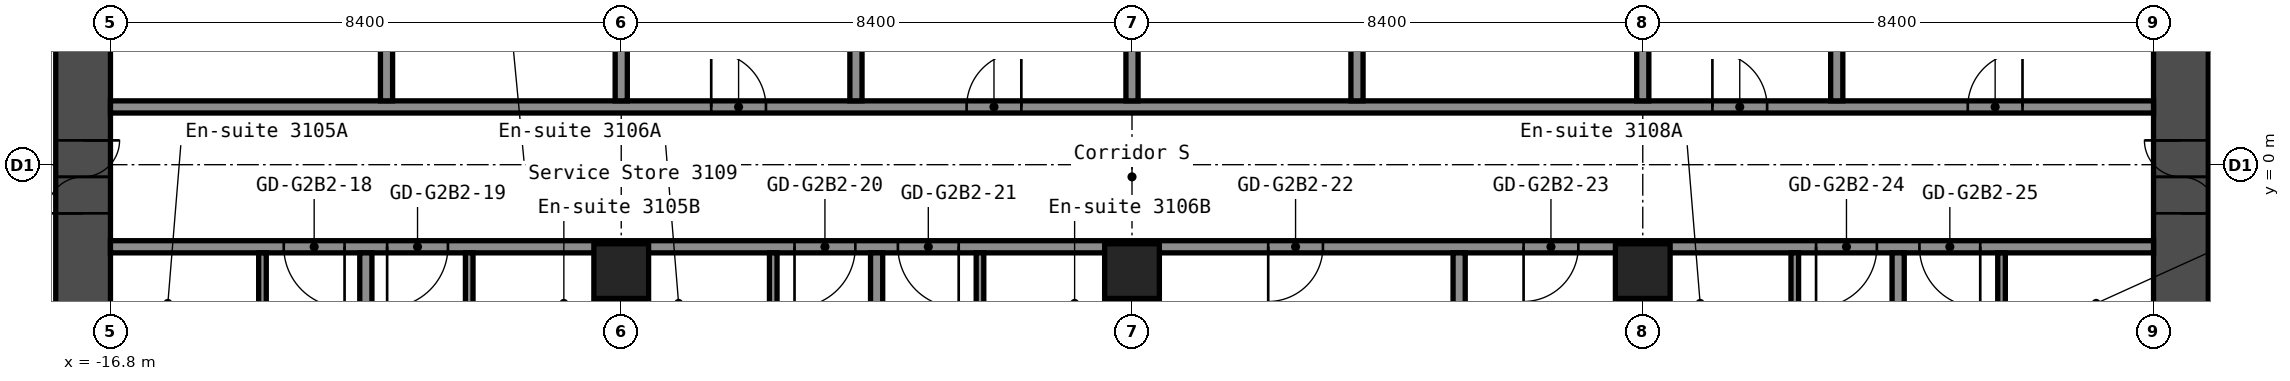
"""IFC4 building model, lengths in metres.
Left out: names, types, materials, properties, quantities, classifications, styles, units other than length and angle.
Written with IfcOpenShell. Run it as: python <this file> out.ifc"""

import sys

from ifc_helpers import new_model, si_unit, direction, frame, frame_2d, origin, origin_2d, place, context, subcontext, project, spatial, rectangle, hollow_rectangle, extrude, element, fill, save


model = new_model("IFC4")
c1 = context("Model", 3, precision=1e-05, world=origin(), true_north=direction((0.0, 1.0)))
c2 = subcontext(c1, "Body", "Model", "MODEL_VIEW")
j1 = project(units=[si_unit("LENGTHUNIT", "METRE"), si_unit("PLANEANGLEUNIT", "RADIAN")], contexts=[c1])
p1 = place(None, origin())
s1 = spatial("IfcSite", under=j1, at=p1, CompositionType="ELEMENT")
p2 = place(p1, origin())
s2 = spatial("IfcBuilding", under=s1, at=p2, CompositionType="ELEMENT")
p3 = place(p2, frame((0.0, 0.0, 110.6)))
s3 = spatial("IfcBuildingStorey", under=s2, at=p3, CompositionType="ELEMENT", Elevation=110.6)
for number, where, z_axis, x_axis in (
    (1, (-8.4, -1.75, 0.0), (0.0, 0.0, 1.0), (1.0, 0.0, 0.0)),
    (2, (0.0, -1.75, 0.0), (0.0, 0.0, 1.0), (1.0, 0.0, 0.0)),
    (3, (8.4, -1.75, 0.0), (0.0, 0.0, 1.0), (1.0, 0.0, 0.0)),
):
    element("IfcColumn", number, at=place(p3, frame(where, z_axis=z_axis, x_axis=x_axis)), inside=s3, PredefinedType="COLUMN", context=c2, shape_type="SweptSolid", body=[
        extrude(hollow_rectangle(XDim=0.9, YDim=0.9, WallThickness=0.036, at=origin_2d()), origin(), (0.0, 0.0, 1.0), 2.8),
    ])
p4 = place(p3, frame((-17.25, -8.4, 0.0), z_axis=(0.0, 0.0, 1.0), x_axis=(0.0, 1.0, 0.0)))
e4 = element("IfcWall", 4, at=p4, inside=s3, PredefinedType="SHEAR", context=c2, shape_type="SweptSolid", body=[
    extrude(rectangle(XDim=16.8, YDim=0.9, at=frame_2d((8.4, 0.0))), origin(), (0.0, 0.0, 1.0), 2.8),
])
p5 = place(p4, frame((7.6, 0.0, 0.0)))
e5 = element("IfcOpeningElement", 5, at=p5, cuts=e4, PredefinedType="OPENING", context=c2, shape_type="SweptSolid", body=[
    extrude(rectangle(XDim=1.2, YDim=2.1, at=frame_2d((0.6, 1.05))), frame((0.0, 0.46, 0.0), z_axis=(0.0, -1.0, 0.0), x_axis=(1.0, 0.0, 0.0)), (0.0, 0.0, 1.0), 0.92),
])
p6 = place(p3, frame((17.25, -8.4, 0.0), z_axis=(0.0, 0.0, 1.0), x_axis=(0.0, 1.0, 0.0)))
e6 = element("IfcWall", 6, at=p6, inside=s3, PredefinedType="SHEAR", context=c2, shape_type="SweptSolid", body=[
    extrude(rectangle(XDim=16.8, YDim=0.9, at=frame_2d((8.4, 0.0))), origin(), (0.0, 0.0, 1.0), 2.8),
])
p7 = place(p6, frame((7.6, 0.0, 0.0)))
e7 = element("IfcOpeningElement", 7, at=p7, cuts=e6, PredefinedType="OPENING", context=c2, shape_type="SweptSolid", body=[
    extrude(rectangle(XDim=1.2, YDim=2.1, at=frame_2d((0.6, 1.05))), frame((0.0, 0.46, 0.0), z_axis=(0.0, -1.0, 0.0), x_axis=(1.0, 0.0, 0.0)), (0.0, 0.0, 1.0), 0.92),
])
p8 = place(p3, frame((-16.8, -1.35, 0.0), z_axis=(0.0, 0.0, 1.0), x_axis=(1.0, 0.0, 0.0)))
e8 = element("IfcWall", 8, at=p8, inside=s3, PredefinedType="PARTITIONING", context=c2, shape_type="SweptSolid", body=[
    extrude(rectangle(XDim=33.6, YDim=0.2, at=frame_2d((16.8, 0.0))), origin(), (0.0, 0.0, 1.0), 2.8),
])
p9 = place(p8, frame((2.85, 0.0, 0.0)))
e9 = element("IfcOpeningElement", 9, at=p9, cuts=e8, PredefinedType="OPENING", context=c2, shape_type="SweptSolid", body=[
    extrude(rectangle(XDim=1.0, YDim=2.1, at=frame_2d((0.5, 1.05))), frame((0.0, 0.11, 0.0), z_axis=(0.0, -1.0, 0.0), x_axis=(1.0, 0.0, 0.0)), (0.0, 0.0, 1.0), 0.22),
])
p10 = place(p8, frame((4.55, 0.0, 0.0)))
e10 = element("IfcOpeningElement", 10, at=p10, cuts=e8, PredefinedType="OPENING", context=c2, shape_type="SweptSolid", body=[
    extrude(rectangle(XDim=1.0, YDim=2.1, at=frame_2d((0.5, 1.05))), frame((0.0, 0.11, 0.0), z_axis=(0.0, -1.0, 0.0), x_axis=(1.0, 0.0, 0.0)), (0.0, 0.0, 1.0), 0.22),
])
p11 = place(p8, frame((11.25, 0.0, 0.0)))
e11 = element("IfcOpeningElement", 11, at=p11, cuts=e8, PredefinedType="OPENING", context=c2, shape_type="SweptSolid", body=[
    extrude(rectangle(XDim=1.0, YDim=2.1, at=frame_2d((0.5, 1.05))), frame((0.0, 0.11, 0.0), z_axis=(0.0, -1.0, 0.0), x_axis=(1.0, 0.0, 0.0)), (0.0, 0.0, 1.0), 0.22),
])
p12 = place(p8, frame((12.95, 0.0, 0.0)))
e12 = element("IfcOpeningElement", 12, at=p12, cuts=e8, PredefinedType="OPENING", context=c2, shape_type="SweptSolid", body=[
    extrude(rectangle(XDim=1.0, YDim=2.1, at=frame_2d((0.5, 1.05))), frame((0.0, 0.11, 0.0), z_axis=(0.0, -1.0, 0.0), x_axis=(1.0, 0.0, 0.0)), (0.0, 0.0, 1.0), 0.22),
])
p13 = place(p8, frame((19.04, 0.0, 0.0)))
e13 = element("IfcOpeningElement", 13, at=p13, cuts=e8, PredefinedType="OPENING", context=c2, shape_type="SweptSolid", body=[
    extrude(rectangle(XDim=0.9, YDim=2.1, at=frame_2d((0.45, 1.05))), frame((0.0, 0.11, 0.0), z_axis=(0.0, -1.0, 0.0), x_axis=(1.0, 0.0, 0.0)), (0.0, 0.0, 1.0), 0.22),
])
p14 = place(p8, frame((23.24, 0.0, 0.0)))
e14 = element("IfcOpeningElement", 14, at=p14, cuts=e8, PredefinedType="OPENING", context=c2, shape_type="SweptSolid", body=[
    extrude(rectangle(XDim=0.9, YDim=2.1, at=frame_2d((0.45, 1.05))), frame((0.0, 0.11, 0.0), z_axis=(0.0, -1.0, 0.0), x_axis=(1.0, 0.0, 0.0)), (0.0, 0.0, 1.0), 0.22),
])
p15 = place(p8, frame((28.05, 0.0, 0.0)))
e15 = element("IfcOpeningElement", 15, at=p15, cuts=e8, PredefinedType="OPENING", context=c2, shape_type="SweptSolid", body=[
    extrude(rectangle(XDim=1.0, YDim=2.1, at=frame_2d((0.5, 1.05))), frame((0.0, 0.11, 0.0), z_axis=(0.0, -1.0, 0.0), x_axis=(1.0, 0.0, 0.0)), (0.0, 0.0, 1.0), 0.22),
])
p16 = place(p8, frame((29.75, 0.0, 0.0)))
e16 = element("IfcOpeningElement", 16, at=p16, cuts=e8, PredefinedType="OPENING", context=c2, shape_type="SweptSolid", body=[
    extrude(rectangle(XDim=1.0, YDim=2.1, at=frame_2d((0.5, 1.05))), frame((0.0, 0.11, 0.0), z_axis=(0.0, -1.0, 0.0), x_axis=(1.0, 0.0, 0.0)), (0.0, 0.0, 1.0), 0.22),
])
p17 = place(p3, frame((-16.8, 0.95, 0.0), z_axis=(0.0, 0.0, 1.0), x_axis=(1.0, 0.0, 0.0)))
e17 = element("IfcWall", 17, at=p17, inside=s3, PredefinedType="PARTITIONING", context=c2, shape_type="SweptSolid", body=[
    extrude(rectangle(XDim=33.6, YDim=0.2, at=frame_2d((16.8, 0.0))), origin(), (0.0, 0.0, 1.0), 2.8),
])
p18 = place(p17, frame((9.88, 0.0, 0.0)))
e18 = element("IfcOpeningElement", 18, at=p18, cuts=e17, PredefinedType="OPENING", context=c2, shape_type="SweptSolid", body=[
    extrude(rectangle(XDim=0.9, YDim=2.1, at=frame_2d((0.45, 1.05))), frame((0.0, 0.11, 0.0), z_axis=(0.0, -1.0, 0.0), x_axis=(1.0, 0.0, 0.0)), (0.0, 0.0, 1.0), 0.22),
])
p19 = place(p17, frame((14.08, 0.0, 0.0)))
e19 = element("IfcOpeningElement", 19, at=p19, cuts=e17, PredefinedType="OPENING", context=c2, shape_type="SweptSolid", body=[
    extrude(rectangle(XDim=0.9, YDim=2.1, at=frame_2d((0.45, 1.05))), frame((0.0, 0.11, 0.0), z_axis=(0.0, -1.0, 0.0), x_axis=(1.0, 0.0, 0.0)), (0.0, 0.0, 1.0), 0.22),
])
p20 = place(p17, frame((26.345, 0.0, 0.0)))
e20 = element("IfcOpeningElement", 20, at=p20, cuts=e17, PredefinedType="OPENING", context=c2, shape_type="SweptSolid", body=[
    extrude(rectangle(XDim=0.9, YDim=2.1, at=frame_2d((0.45, 1.05))), frame((0.0, 0.11, 0.0), z_axis=(0.0, -1.0, 0.0), x_axis=(1.0, 0.0, 0.0)), (0.0, 0.0, 1.0), 0.22),
])
p21 = place(p17, frame((30.545, 0.0, 0.0)))
e21 = element("IfcOpeningElement", 21, at=p21, cuts=e17, PredefinedType="OPENING", context=c2, shape_type="SweptSolid", body=[
    extrude(rectangle(XDim=0.9, YDim=2.1, at=frame_2d((0.45, 1.05))), frame((0.0, 0.11, 0.0), z_axis=(0.0, -1.0, 0.0), x_axis=(1.0, 0.0, 0.0)), (0.0, 0.0, 1.0), 0.22),
])
p22 = place(p3, frame((-14.3, -4.35, 0.0), z_axis=(0.0, 0.0, 1.0), x_axis=(0.0, 1.0, 0.0)))
e22 = element("IfcWall", 22, at=p22, inside=s3, PredefinedType="PARTITIONING", context=c2, shape_type="SweptSolid", body=[
    extrude(rectangle(XDim=2.9, YDim=0.125, at=frame_2d((1.45, 0.0))), origin(), (0.0, 0.0, 1.0), 2.8),
])
p23 = place(p22, frame((0.6, 0.0, 0.0)))
e23 = element("IfcOpeningElement", 23, at=p23, cuts=e22, PredefinedType="OPENING", context=c2, shape_type="SweptSolid", body=[
    extrude(rectangle(XDim=0.8, YDim=2.1, at=frame_2d((0.4, 1.05))), frame((0.0, 0.073, 0.0), z_axis=(0.0, -1.0, 0.0), x_axis=(1.0, 0.0, 0.0)), (0.0, 0.0, 1.0), 0.145),
])
p24 = place(p3, frame((-12.6, -15.55, 0.0), z_axis=(0.0, 0.0, 1.0), x_axis=(0.0, 1.0, 0.0)))
e24 = element("IfcWall", 24, at=p24, inside=s3, PredefinedType="PARTITIONING", context=c2, shape_type="SweptSolid", body=[
    extrude(rectangle(XDim=14.1, YDim=0.2, at=frame_2d((7.05, 0.0))), origin(), (0.0, 0.0, 1.0), 2.8),
])
p25 = place(p3, frame((-12.26, 1.05, 0.0), z_axis=(0.0, 0.0, 1.0), x_axis=(0.0, 1.0, 0.0)))
e25 = element("IfcWall", 25, at=p25, inside=s3, PredefinedType="PARTITIONING", context=c2, shape_type="SweptSolid", body=[
    extrude(rectangle(XDim=5.9, YDim=0.2, at=frame_2d((2.95, 0.0))), origin(), (0.0, 0.0, 1.0), 2.8),
])
p26 = place(p3, frame((-10.9, -4.35, 0.0), z_axis=(0.0, 0.0, 1.0), x_axis=(0.0, 1.0, 0.0)))
e26 = element("IfcWall", 26, at=p26, inside=s3, PredefinedType="PARTITIONING", context=c2, shape_type="SweptSolid", body=[
    extrude(rectangle(XDim=2.9, YDim=0.125, at=frame_2d((1.45, 0.0))), origin(), (0.0, 0.0, 1.0), 2.8),
])
p27 = place(p26, frame((0.6, 0.0, 0.0)))
e27 = element("IfcOpeningElement", 27, at=p27, cuts=e26, PredefinedType="OPENING", context=c2, shape_type="SweptSolid", body=[
    extrude(rectangle(XDim=0.8, YDim=2.1, at=frame_2d((0.4, 1.05))), frame((0.0, 0.073, 0.0), z_axis=(0.0, -1.0, 0.0), x_axis=(1.0, 0.0, 0.0)), (0.0, 0.0, 1.0), 0.145),
])
p28 = place(p3, frame((-8.4, -15.55, 0.0), z_axis=(0.0, 0.0, 1.0), x_axis=(0.0, 1.0, 0.0)))
e28 = element("IfcWall", 28, at=p28, inside=s3, PredefinedType="PARTITIONING", context=c2, shape_type="SweptSolid", body=[
    extrude(rectangle(XDim=13.36, YDim=0.2, at=frame_2d((6.68, 0.0))), origin(), (0.0, 0.0, 1.0), 2.8),
])
p29 = place(p3, frame((-8.4, 1.05, 0.0), z_axis=(0.0, 0.0, 1.0), x_axis=(0.0, 1.0, 0.0)))
e29 = element("IfcWall", 29, at=p29, inside=s3, PredefinedType="PARTITIONING", context=c2, shape_type="SweptSolid", body=[
    extrude(rectangle(XDim=5.9, YDim=0.2, at=frame_2d((2.95, 0.0))), origin(), (0.0, 0.0, 1.0), 2.8),
])
p30 = place(p3, frame((-5.9, -4.35, 0.0), z_axis=(0.0, 0.0, 1.0), x_axis=(0.0, 1.0, 0.0)))
e30 = element("IfcWall", 30, at=p30, inside=s3, PredefinedType="PARTITIONING", context=c2, shape_type="SweptSolid", body=[
    extrude(rectangle(XDim=2.9, YDim=0.125, at=frame_2d((1.45, 0.0))), origin(), (0.0, 0.0, 1.0), 2.8),
])
p31 = place(p30, frame((0.6, 0.0, 0.0)))
e31 = element("IfcOpeningElement", 31, at=p31, cuts=e30, PredefinedType="OPENING", context=c2, shape_type="SweptSolid", body=[
    extrude(rectangle(XDim=0.8, YDim=2.1, at=frame_2d((0.4, 1.05))), frame((0.0, 0.073, 0.0), z_axis=(0.0, -1.0, 0.0), x_axis=(1.0, 0.0, 0.0)), (0.0, 0.0, 1.0), 0.145),
])
p32 = place(p3, frame((-4.54, 1.05, 0.0), z_axis=(0.0, 0.0, 1.0), x_axis=(0.0, 1.0, 0.0)))
e32 = element("IfcWall", 32, at=p32, inside=s3, PredefinedType="PARTITIONING", context=c2, shape_type="SweptSolid", body=[
    extrude(rectangle(XDim=5.9, YDim=0.2, at=frame_2d((2.95, 0.0))), origin(), (0.0, 0.0, 1.0), 2.8),
])
p33 = place(p3, frame((-4.2, -15.55, 0.0), z_axis=(0.0, 0.0, 1.0), x_axis=(0.0, 1.0, 0.0)))
e33 = element("IfcWall", 33, at=p33, inside=s3, PredefinedType="PARTITIONING", context=c2, shape_type="SweptSolid", body=[
    extrude(rectangle(XDim=14.1, YDim=0.2, at=frame_2d((7.05, 0.0))), origin(), (0.0, 0.0, 1.0), 2.8),
])
p34 = place(p3, frame((-2.5, -4.35, 0.0), z_axis=(0.0, 0.0, 1.0), x_axis=(0.0, 1.0, 0.0)))
e34 = element("IfcWall", 34, at=p34, inside=s3, PredefinedType="PARTITIONING", context=c2, shape_type="SweptSolid", body=[
    extrude(rectangle(XDim=2.9, YDim=0.125, at=frame_2d((1.45, 0.0))), origin(), (0.0, 0.0, 1.0), 2.8),
])
p35 = place(p34, frame((0.6, 0.0, 0.0)))
e35 = element("IfcOpeningElement", 35, at=p35, cuts=e34, PredefinedType="OPENING", context=c2, shape_type="SweptSolid", body=[
    extrude(rectangle(XDim=0.8, YDim=2.1, at=frame_2d((0.4, 1.05))), frame((0.0, 0.073, 0.0), z_axis=(0.0, -1.0, 0.0), x_axis=(1.0, 0.0, 0.0)), (0.0, 0.0, 1.0), 0.145),
])
p36 = place(p3, frame((0.0, -15.55, 0.0), z_axis=(0.0, 0.0, 1.0), x_axis=(0.0, 1.0, 0.0)))
e36 = element("IfcWall", 36, at=p36, inside=s3, PredefinedType="PARTITIONING", context=c2, shape_type="SweptSolid", body=[
    extrude(rectangle(XDim=13.36, YDim=0.2, at=frame_2d((6.68, 0.0))), origin(), (0.0, 0.0, 1.0), 2.8),
])
for number, where, z_axis, x_axis in (
    (37, (0.0, 1.05, 0.0), (0.0, 0.0, 1.0), (0.0, 1.0, 0.0)),
    (38, (3.7, 1.05, 0.0), (0.0, 0.0, 1.0), (0.0, 1.0, 0.0)),
):
    element("IfcWall", number, at=place(p3, frame(where, z_axis=z_axis, x_axis=x_axis)), inside=s3, PredefinedType="PARTITIONING", context=c2, shape_type="SweptSolid", body=[
        extrude(rectangle(XDim=5.9, YDim=0.2, at=frame_2d((2.95, 0.0))), origin(), (0.0, 0.0, 1.0), 2.8),
    ])
p37 = place(p3, frame((5.38, -15.55, 0.0), z_axis=(0.0, 0.0, 1.0), x_axis=(0.0, 1.0, 0.0)))
e39 = element("IfcWall", 39, at=p37, inside=s3, PredefinedType="PARTITIONING", context=c2, shape_type="SweptSolid", body=[
    extrude(rectangle(XDim=14.1, YDim=0.2, at=frame_2d((7.05, 0.0))), origin(), (0.0, 0.0, 1.0), 2.8),
])
p38 = place(p3, frame((8.4, -15.55, 0.0), z_axis=(0.0, 0.0, 1.0), x_axis=(0.0, 1.0, 0.0)))
e40 = element("IfcWall", 40, at=p38, inside=s3, PredefinedType="PARTITIONING", context=c2, shape_type="SweptSolid", body=[
    extrude(rectangle(XDim=13.36, YDim=0.2, at=frame_2d((6.68, 0.0))), origin(), (0.0, 0.0, 1.0), 2.8),
])
p39 = place(p3, frame((8.4, 1.05, 0.0), z_axis=(0.0, 0.0, 1.0), x_axis=(0.0, 1.0, 0.0)))
e41 = element("IfcWall", 41, at=p39, inside=s3, PredefinedType="PARTITIONING", context=c2, shape_type="SweptSolid", body=[
    extrude(rectangle(XDim=5.9, YDim=0.2, at=frame_2d((2.95, 0.0))), origin(), (0.0, 0.0, 1.0), 2.8),
])
p40 = place(p3, frame((10.9, -4.35, 0.0), z_axis=(0.0, 0.0, 1.0), x_axis=(0.0, 1.0, 0.0)))
e42 = element("IfcWall", 42, at=p40, inside=s3, PredefinedType="PARTITIONING", context=c2, shape_type="SweptSolid", body=[
    extrude(rectangle(XDim=2.9, YDim=0.125, at=frame_2d((1.45, 0.0))), origin(), (0.0, 0.0, 1.0), 2.8),
])
p41 = place(p40, frame((0.6, 0.0, 0.0)))
e43 = element("IfcOpeningElement", 43, at=p41, cuts=e42, PredefinedType="OPENING", context=c2, shape_type="SweptSolid", body=[
    extrude(rectangle(XDim=0.8, YDim=2.1, at=frame_2d((0.4, 1.05))), frame((0.0, 0.073, 0.0), z_axis=(0.0, -1.0, 0.0), x_axis=(1.0, 0.0, 0.0)), (0.0, 0.0, 1.0), 0.145),
])
p42 = place(p3, frame((11.59, 1.05, 0.0), z_axis=(0.0, 0.0, 1.0), x_axis=(0.0, 1.0, 0.0)))
e44 = element("IfcWall", 44, at=p42, inside=s3, PredefinedType="PARTITIONING", context=c2, shape_type="SweptSolid", body=[
    extrude(rectangle(XDim=5.9, YDim=0.2, at=frame_2d((2.95, 0.0))), origin(), (0.0, 0.0, 1.0), 2.8),
])
p43 = place(p3, frame((12.6, -15.55, 0.0), z_axis=(0.0, 0.0, 1.0), x_axis=(0.0, 1.0, 0.0)))
e45 = element("IfcWall", 45, at=p43, inside=s3, PredefinedType="PARTITIONING", context=c2, shape_type="SweptSolid", body=[
    extrude(rectangle(XDim=14.1, YDim=0.2, at=frame_2d((7.05, 0.0))), origin(), (0.0, 0.0, 1.0), 2.8),
])
p44 = place(p3, frame((14.3, -4.35, 0.0), z_axis=(0.0, 0.0, 1.0), x_axis=(0.0, 1.0, 0.0)))
e46 = element("IfcWall", 46, at=p44, inside=s3, PredefinedType="PARTITIONING", context=c2, shape_type="SweptSolid", body=[
    extrude(rectangle(XDim=2.9, YDim=0.125, at=frame_2d((1.45, 0.0))), origin(), (0.0, 0.0, 1.0), 2.8),
])
p45 = place(p44, frame((0.6, 0.0, 0.0)))
e47 = element("IfcOpeningElement", 47, at=p45, cuts=e46, PredefinedType="OPENING", context=c2, shape_type="SweptSolid", body=[
    extrude(rectangle(XDim=0.8, YDim=2.1, at=frame_2d((0.4, 1.05))), frame((0.0, 0.073, 0.0), z_axis=(0.0, -1.0, 0.0), x_axis=(1.0, 0.0, 0.0)), (0.0, 0.0, 1.0), 0.145),
])
p46 = place(p5, origin())
e48 = element("IfcDoor", 48, at=p46, inside=s3, OperationType="DOUBLE_DOOR_SINGLE_SWING", PredefinedType="DOOR", context=c2, shape_type="SweptSolid", body=[
    extrude(rectangle(XDim=1.2, YDim=2.1, at=frame_2d((0.6, 1.05))), frame((0.0, 0.025, 0.0), z_axis=(0.0, -1.0, 0.0), x_axis=(1.0, 0.0, 0.0)), (0.0, 0.0, 1.0), 0.05),
])
fill(e5, e48)
p47 = place(p7, origin())
e49 = element("IfcDoor", 49, at=p47, inside=s3, OperationType="DOUBLE_DOOR_SINGLE_SWING", PredefinedType="DOOR", context=c2, shape_type="SweptSolid", body=[
    extrude(rectangle(XDim=1.2, YDim=2.1, at=frame_2d((0.6, 1.05))), frame((0.0, 0.025, 0.0), z_axis=(0.0, -1.0, 0.0), x_axis=(1.0, 0.0, 0.0)), (0.0, 0.0, 1.0), 0.05),
])
fill(e7, e49)
p48 = place(p9, origin())
e50 = element("IfcDoor", 50, at=p48, inside=s3, OperationType="SINGLE_SWING_RIGHT", PredefinedType="DOOR", context=c2, shape_type="SweptSolid", body=[
    extrude(rectangle(XDim=1.0, YDim=2.1, at=frame_2d((0.5, 1.05))), frame((0.0, 0.025, 0.0), z_axis=(0.0, -1.0, 0.0), x_axis=(1.0, 0.0, 0.0)), (0.0, 0.0, 1.0), 0.05),
])
fill(e9, e50)
p49 = place(p10, origin())
e51 = element("IfcDoor", 51, at=p49, inside=s3, OperationType="SINGLE_SWING_LEFT", PredefinedType="DOOR", context=c2, shape_type="SweptSolid", body=[
    extrude(rectangle(XDim=1.0, YDim=2.1, at=frame_2d((0.5, 1.05))), frame((0.0, 0.025, 0.0), z_axis=(0.0, -1.0, 0.0), x_axis=(1.0, 0.0, 0.0)), (0.0, 0.0, 1.0), 0.05),
])
fill(e10, e51)
p50 = place(p11, origin())
e52 = element("IfcDoor", 52, at=p50, inside=s3, OperationType="SINGLE_SWING_LEFT", PredefinedType="DOOR", context=c2, shape_type="SweptSolid", body=[
    extrude(rectangle(XDim=1.0, YDim=2.1, at=frame_2d((0.5, 1.05))), frame((0.0, 0.025, 0.0), z_axis=(0.0, -1.0, 0.0), x_axis=(1.0, 0.0, 0.0)), (0.0, 0.0, 1.0), 0.05),
])
fill(e11, e52)
p51 = place(p12, origin())
e53 = element("IfcDoor", 53, at=p51, inside=s3, OperationType="SINGLE_SWING_RIGHT", PredefinedType="DOOR", context=c2, shape_type="SweptSolid", body=[
    extrude(rectangle(XDim=1.0, YDim=2.1, at=frame_2d((0.5, 1.05))), frame((0.0, 0.025, 0.0), z_axis=(0.0, -1.0, 0.0), x_axis=(1.0, 0.0, 0.0)), (0.0, 0.0, 1.0), 0.05),
])
fill(e12, e53)
p52 = place(p13, origin())
e54 = element("IfcDoor", 54, at=p52, inside=s3, OperationType="SINGLE_SWING_LEFT", PredefinedType="DOOR", context=c2, shape_type="SweptSolid", body=[
    extrude(rectangle(XDim=0.9, YDim=2.1, at=frame_2d((0.45, 1.05))), frame((0.0, 0.025, 0.0), z_axis=(0.0, -1.0, 0.0), x_axis=(1.0, 0.0, 0.0)), (0.0, 0.0, 1.0), 0.05),
])
fill(e13, e54)
p53 = place(p14, origin())
e55 = element("IfcDoor", 55, at=p53, inside=s3, OperationType="SINGLE_SWING_LEFT", PredefinedType="DOOR", context=c2, shape_type="SweptSolid", body=[
    extrude(rectangle(XDim=0.9, YDim=2.1, at=frame_2d((0.45, 1.05))), frame((0.0, 0.025, 0.0), z_axis=(0.0, -1.0, 0.0), x_axis=(1.0, 0.0, 0.0)), (0.0, 0.0, 1.0), 0.05),
])
fill(e14, e55)
p54 = place(p15, origin())
e56 = element("IfcDoor", 56, at=p54, inside=s3, OperationType="SINGLE_SWING_LEFT", PredefinedType="DOOR", context=c2, shape_type="SweptSolid", body=[
    extrude(rectangle(XDim=1.0, YDim=2.1, at=frame_2d((0.5, 1.05))), frame((0.0, 0.025, 0.0), z_axis=(0.0, -1.0, 0.0), x_axis=(1.0, 0.0, 0.0)), (0.0, 0.0, 1.0), 0.05),
])
fill(e15, e56)
p55 = place(p16, origin())
e57 = element("IfcDoor", 57, at=p55, inside=s3, OperationType="SINGLE_SWING_RIGHT", PredefinedType="DOOR", context=c2, shape_type="SweptSolid", body=[
    extrude(rectangle(XDim=1.0, YDim=2.1, at=frame_2d((0.5, 1.05))), frame((0.0, 0.025, 0.0), z_axis=(0.0, -1.0, 0.0), x_axis=(1.0, 0.0, 0.0)), (0.0, 0.0, 1.0), 0.05),
])
fill(e16, e57)
p56 = place(p18, origin())
e58 = element("IfcDoor", 58, at=p56, inside=s3, OperationType="SINGLE_SWING_RIGHT", PredefinedType="DOOR", context=c2, shape_type="SweptSolid", body=[
    extrude(rectangle(XDim=0.9, YDim=2.1, at=frame_2d((0.45, 1.05))), frame((0.0, 0.025, 0.0), z_axis=(0.0, -1.0, 0.0), x_axis=(1.0, 0.0, 0.0)), (0.0, 0.0, 1.0), 0.05),
])
fill(e18, e58)
p57 = place(p19, origin())
e59 = element("IfcDoor", 59, at=p57, inside=s3, OperationType="SINGLE_SWING_LEFT", PredefinedType="DOOR", context=c2, shape_type="SweptSolid", body=[
    extrude(rectangle(XDim=0.9, YDim=2.1, at=frame_2d((0.45, 1.05))), frame((0.0, 0.025, 0.0), z_axis=(0.0, -1.0, 0.0), x_axis=(1.0, 0.0, 0.0)), (0.0, 0.0, 1.0), 0.05),
])
fill(e19, e59)
p58 = place(p20, origin())
e60 = element("IfcDoor", 60, at=p58, inside=s3, OperationType="SINGLE_SWING_RIGHT", PredefinedType="DOOR", context=c2, shape_type="SweptSolid", body=[
    extrude(rectangle(XDim=0.9, YDim=2.1, at=frame_2d((0.45, 1.05))), frame((0.0, 0.025, 0.0), z_axis=(0.0, -1.0, 0.0), x_axis=(1.0, 0.0, 0.0)), (0.0, 0.0, 1.0), 0.05),
])
fill(e20, e60)
p59 = place(p21, origin())
e61 = element("IfcDoor", 61, at=p59, inside=s3, OperationType="SINGLE_SWING_LEFT", PredefinedType="DOOR", context=c2, shape_type="SweptSolid", body=[
    extrude(rectangle(XDim=0.9, YDim=2.1, at=frame_2d((0.45, 1.05))), frame((0.0, 0.025, 0.0), z_axis=(0.0, -1.0, 0.0), x_axis=(1.0, 0.0, 0.0)), (0.0, 0.0, 1.0), 0.05),
])
fill(e21, e61)
save(model, sys.argv[1])
